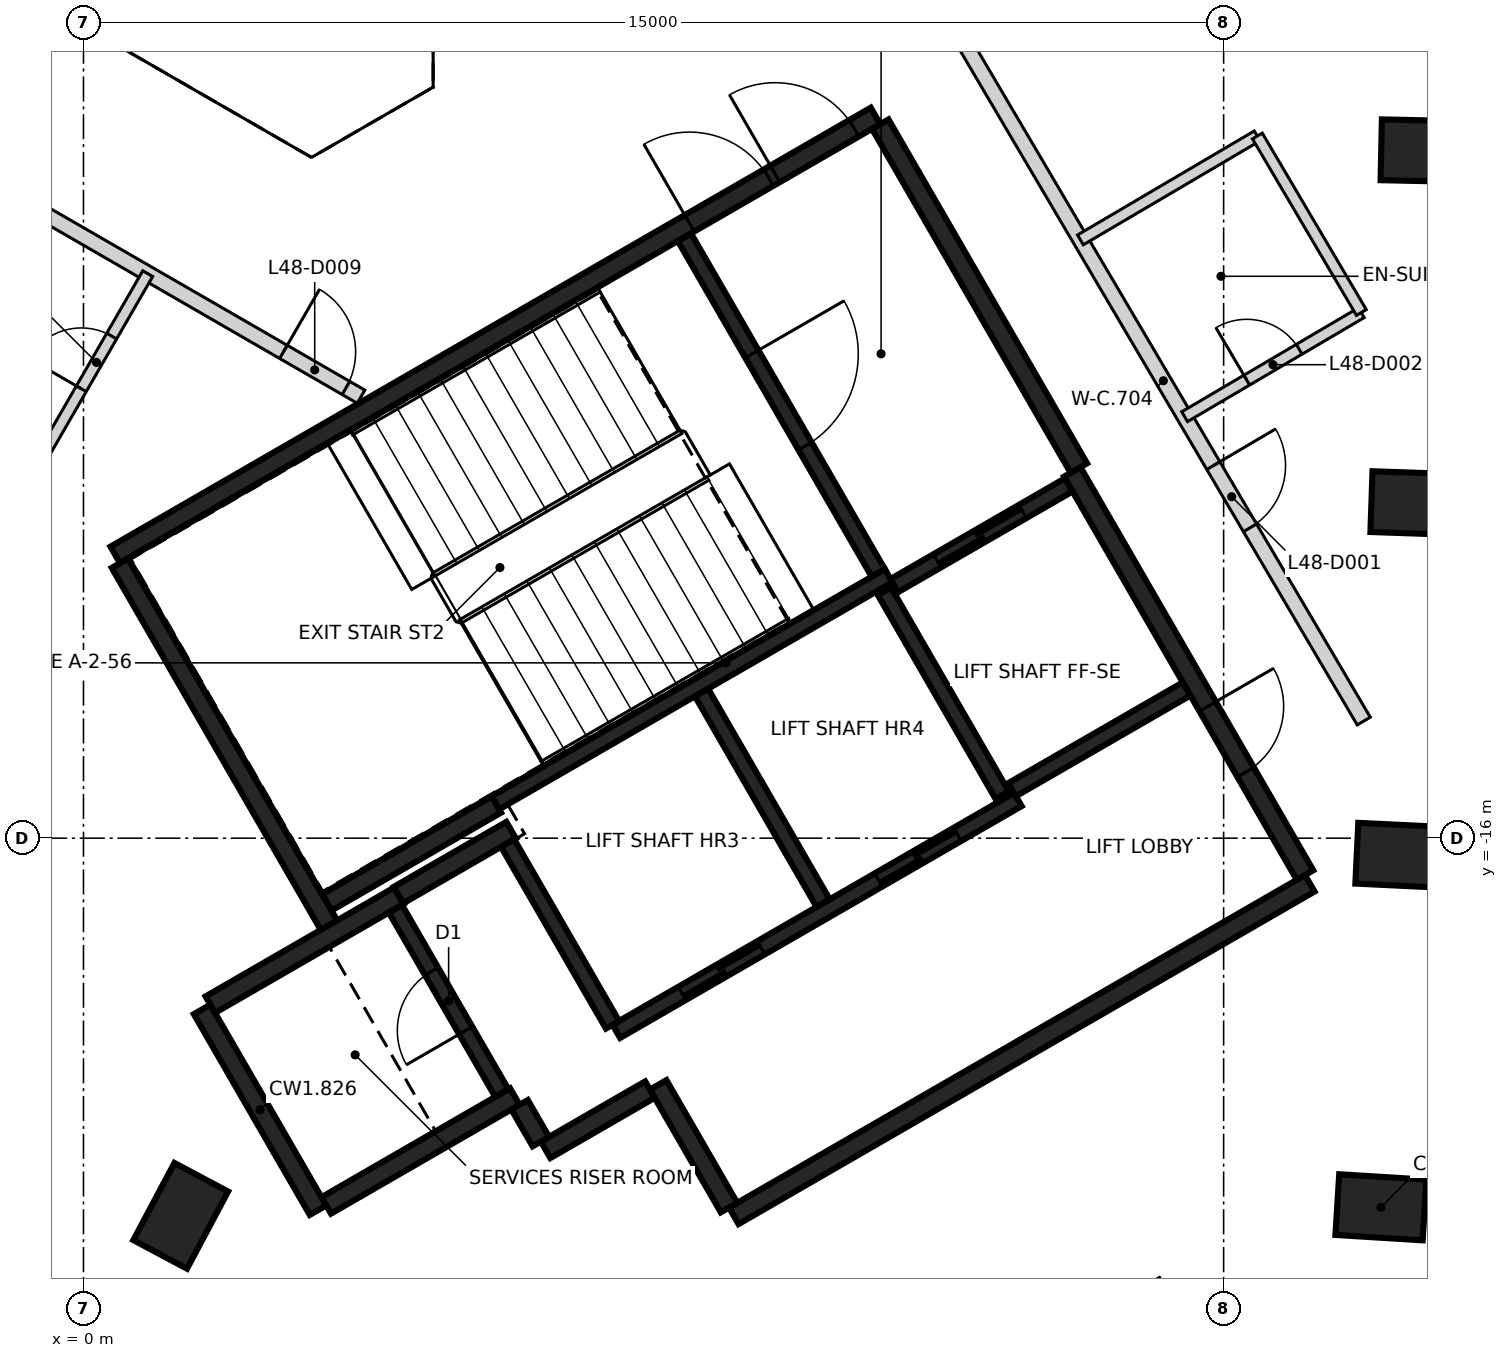
"""IFC4 building model, lengths in metres.
Left out: names, types, materials, properties, quantities, classifications, styles, units other than length and angle.
Written with IfcOpenShell. Run it as: python <this file> out.ifc"""

import sys

from ifc_helpers import new_model, si_unit, direction, frame, frame_2d, origin, origin_2d, place, context, subcontext, project, spatial, rectangle, extrude, element, fill, save


model = new_model("IFC4")
c1 = context("Model", 3, precision=1e-05, world=origin(), true_north=direction((0.0, 1.0)))
c2 = subcontext(c1, "Body", "Model", "MODEL_VIEW")
j1 = project(units=[si_unit("LENGTHUNIT", "METRE"), si_unit("PLANEANGLEUNIT", "RADIAN")], contexts=[c1])
p1 = place(None, origin())
s1 = spatial("IfcSite", under=j1, at=p1, CompositionType="ELEMENT")
p2 = place(p1, origin())
s2 = spatial("IfcBuilding", under=s1, at=p2, CompositionType="ELEMENT")
p3 = place(p2, frame((0.0, 0.0, 193.6)))
s3 = spatial("IfcBuildingStorey", under=s2, at=p3, CompositionType="ELEMENT", Elevation=193.6)
for number, where, z_axis, x_axis in (
    (1, (17.07, -20.856, -0.35), (0.0, 0.0, 1.0), (-0.998, 0.062, 0.0)),
    (2, (17.326, -16.226, -0.35), (0.0, 0.0, 1.0), (-0.999, 0.048, 0.0)),
    (3, (17.519, -11.592, -0.35), (0.0, 0.0, 1.0), (-0.999, 0.034, 0.0)),
    (4, (17.648, -6.956, -0.35), (0.0, 0.0, 1.0), (-1.0, 0.021, 0.0)),
    (5, (1.279, -20.968, -0.35), (0.0, 0.0, 1.0), (0.47, 0.883, 0.0)),
):
    element("IfcColumn", number, at=place(p3, frame(where, z_axis=z_axis, x_axis=x_axis)), inside=s3, PredefinedType="COLUMN", context=c2, shape_type="SweptSolid", body=[
        extrude(rectangle(XDim=1.15, YDim=0.8, at=origin_2d()), origin(), (0.0, 0.0, 1.0), 3.6),
    ])
p4 = place(p3, frame((0.417, -12.273, 0.0), z_axis=(0.0, 0.0, 1.0), x_axis=(0.866021906294, 0.500006057782, 0.0)))
e6 = element("IfcWall", 6, at=p4, inside=s3, PredefinedType="SHEAR", context=c2, shape_type="SweptSolid", body=[
    extrude(rectangle(XDim=11.55, YDim=0.25, at=frame_2d((5.775, 0.0))), origin(), (0.0, 0.0, 1.0), 3.25),
])
p5 = place(p4, frame((10.025, 0.0, 0.0)))
e7 = element("IfcOpeningElement", 7, at=p5, cuts=e6, PredefinedType="OPENING", context=c2, shape_type="SweptSolid", body=[
    extrude(rectangle(XDim=1.2, YDim=2.1, at=frame_2d((0.6, 1.05))), frame((0.0, 0.135, 0.0), z_axis=(0.0, -1.0, 0.0), x_axis=(1.0, 0.0, 0.0)), (0.0, 0.0, 1.0), 0.27),
])
p6 = place(p4, frame((8.725, 0.0, 0.0)))
e8 = element("IfcOpeningElement", 8, at=p6, cuts=e6, PredefinedType="OPENING", context=c2, shape_type="SweptSolid", body=[
    extrude(rectangle(XDim=1.2, YDim=2.1, at=frame_2d((0.6, 1.05))), frame((0.0, 0.135, 0.0), z_axis=(0.0, -1.0, 0.0), x_axis=(1.0, 0.0, 0.0)), (0.0, 0.0, 1.0), 0.27),
])
p7 = place(p3, frame((16.133, -16.594, 0.0), z_axis=(0.0, 0.0, 1.0), x_axis=(-0.866022959057, -0.500004234368, 0.0)))
e9 = element("IfcWall", 9, at=p7, inside=s3, PredefinedType="SHEAR", context=c2, shape_type="SweptSolid", body=[
    extrude(rectangle(XDim=8.75, YDim=0.25, at=frame_2d((4.375, 0.0))), origin(), (0.0, 0.0, 1.0), 3.25),
])
p8 = place(p3, frame((13.008, -11.181, 0.0), z_axis=(0.0, 0.0, 1.0), x_axis=(0.500001955336, -0.866024274868, 0.0)))
e10 = element("IfcWall", 10, at=p8, inside=s3, PredefinedType="SHEAR", context=c2, shape_type="SweptSolid", body=[
    extrude(rectangle(XDim=6.125, YDim=0.25, at=frame_2d((3.062, 0.0))), origin(), (0.0, 0.0, 1.0), 3.25),
])
p9 = place(p8, frame((3.563, 0.0, 0.0)))
e11 = element("IfcOpeningElement", 11, at=p9, cuts=e10, PredefinedType="OPENING", context=c2, shape_type="SweptSolid", body=[
    extrude(rectangle(XDim=1.0, YDim=2.1, at=frame_2d((0.5, 1.05))), frame((0.0, 0.135, 0.0), z_axis=(0.0, -1.0, 0.0), x_axis=(1.0, 0.0, 0.0)), (0.0, 0.0, 1.0), 0.27),
])
p10 = place(p3, frame((3.235, -17.153, 0.0), z_axis=(0.0, 0.0, 1.0), x_axis=(-0.500008851346, 0.866020293397, 0.0)))
e12 = element("IfcWall", 12, at=p10, inside=s3, PredefinedType="SHEAR", context=c2, shape_type="SweptSolid", body=[
    extrude(rectangle(XDim=5.51, YDim=0.25, at=frame_2d((2.755, 0.0))), origin(), (0.0, 0.0, 1.0), 3.25),
])
p11 = place(p3, frame((10.483, -6.606, 0.0), z_axis=(0.0, 0.0, 1.0), x_axis=(0.49999885962, -0.866026062182, 0.0)))
e13 = element("IfcWall", 13, at=p11, inside=s3, PredefinedType="SHEAR", context=c2, shape_type="SweptSolid", body=[
    extrude(rectangle(XDim=5.225, YDim=0.25, at=frame_2d((2.612, 0.0))), origin(), (0.0, 0.0, 1.0), 3.25),
])
p12 = place(p3, frame((3.085, -20.894, 0.0), z_axis=(0.0, 0.0, 1.0), x_axis=(-0.499978833458, 0.866037623948, 0.0)))
e14 = element("IfcWall", 14, at=p12, inside=s3, PredefinedType="SHEAR", context=c2, shape_type="SweptSolid", body=[
    extrude(rectangle(XDim=3.05, YDim=0.25, at=frame_2d((1.525, 0.0))), origin(), (0.0, 0.0, 1.0), 3.25),
])
p13 = place(p3, frame((1.669, -18.19, 0.0), z_axis=(0.0, 0.0, 1.0), x_axis=(0.866042235819, 0.499970844928, 0.0)))
e15 = element("IfcWall", 15, at=p13, inside=s3, PredefinedType="SHEAR", context=c2, shape_type="SweptSolid", body=[
    extrude(rectangle(XDim=2.865, YDim=0.25, at=frame_2d((1.432, 0.0))), origin(), (0.0, 0.0, 1.0), 3.25),
])
p14 = place(p3, frame((5.675, -19.399, 0.0), z_axis=(0.0, 0.0, 1.0), x_axis=(-0.866026637627, -0.499997862916, 0.0)))
e16 = element("IfcWall", 16, at=p14, inside=s3, PredefinedType="SHEAR", context=c2, shape_type="SweptSolid", body=[
    extrude(rectangle(XDim=2.865, YDim=0.25, at=frame_2d((1.432, 0.0))), origin(), (0.0, 0.0, 1.0), 3.25),
])
p15 = place(p3, frame((5.431, -15.556, 0.0), z_axis=(0.0, 0.0, 1.0), x_axis=(-0.866022940537, -0.500004266446, 0.0)))
e17 = element("IfcWall", 17, at=p15, inside=s3, PredefinedType="SHEAR", context=c2, shape_type="SweptSolid", body=[
    extrude(rectangle(XDim=2.575, YDim=0.25, at=frame_2d((1.287, 0.0))), origin(), (0.0, 0.0, 1.0), 3.25),
])
p16 = place(p3, frame((8.493, -20.86, 0.0), z_axis=(0.0, 0.0, 1.0), x_axis=(-0.500039802285, 0.866002422705, 0.0)))
e18 = element("IfcWall", 18, at=p16, inside=s3, PredefinedType="SHEAR", context=c2, shape_type="SweptSolid", body=[
    extrude(rectangle(XDim=1.865, YDim=0.25, at=frame_2d((0.932, 0.0))), origin(), (0.0, 0.0, 1.0), 3.25),
])
p17 = place(p3, frame((4.145, -16.749, 0.0), z_axis=(0.0, 0.0, 1.0), x_axis=(0.866038183914, 0.499977863513, 0.0)))
e19 = element("IfcWall", 19, at=p17, inside=s3, PredefinedType="SHEAR", context=c2, shape_type="SweptSolid", body=[
    extrude(rectangle(XDim=1.71, YDim=0.25, at=frame_2d((0.855, 0.0))), origin(), (0.0, 0.0, 1.0), 3.25),
])
p18 = place(p3, frame((7.452, -19.308, 0.0), z_axis=(0.0, 0.0, 1.0), x_axis=(-0.866044474677, -0.49996696679, 0.0)))
e20 = element("IfcWall", 20, at=p18, inside=s3, PredefinedType="SHEAR", context=c2, shape_type="SweptSolid", body=[
    extrude(rectangle(XDim=1.584, YDim=0.25, at=frame_2d((0.792, 0.0))), origin(), (0.0, 0.0, 1.0), 3.25),
])
p19 = place(p3, frame((6.017, -19.992, 0.0), z_axis=(0.0, 0.0, 1.0), x_axis=(-0.500364886717, 0.865814633822, 0.0)))
e21 = element("IfcWall", 21, at=p19, inside=s3, PredefinedType="SHEAR", context=c2, shape_type="SweptSolid", body=[
    extrude(rectangle(XDim=0.559, YDim=0.25, at=frame_2d((0.28, 0.0))), origin(), (0.0, 0.0, 1.0), 3.25),
])
p20 = place(p3, frame((5.419, -15.534, 0.0), z_axis=(0.0, 0.0, 1.0), x_axis=(0.866029065029, 0.499993658486, 0.0)))
e22 = element("IfcWall", 22, at=p20, inside=s3, PredefinedType="SHEAR", context=c2, shape_type="SweptSolid", body=[
    extrude(rectangle(XDim=5.974, YDim=0.2, at=frame_2d((2.987, 0.0))), origin(), (0.0, 0.0, 1.0), 3.25),
])
p21 = place(p3, frame((7.01, -18.542, 0.0), z_axis=(0.0, 0.0, 1.0), x_axis=(0.866030299012, 0.499991521122, 0.0)))
e23 = element("IfcWall", 23, at=p21, inside=s3, PredefinedType="SHEAR", context=c2, shape_type="SweptSolid", body=[
    extrude(rectangle(XDim=6.1, YDim=0.2, at=frame_2d((3.05, 0.0))), origin(), (0.0, 0.0, 1.0), 3.25),
])
p22 = place(p21, frame((1.0, 0.0, 0.0)))
e24 = element("IfcOpeningElement", 24, at=p22, cuts=e23, PredefinedType="OPENING", context=c2, shape_type="SweptSolid", body=[
    extrude(rectangle(XDim=1.2, YDim=2.1, at=frame_2d((0.6, 1.05))), frame((0.0, 0.11, 0.0), z_axis=(0.0, -1.0, 0.0), x_axis=(1.0, 0.0, 0.0)), (0.0, 0.0, 1.0), 0.22),
])
p23 = place(p21, frame((3.982, 0.0, 0.0)))
e25 = element("IfcOpeningElement", 25, at=p23, cuts=e23, PredefinedType="OPENING", context=c2, shape_type="SweptSolid", body=[
    extrude(rectangle(XDim=1.2, YDim=2.1, at=frame_2d((0.6, 1.05))), frame((0.0, 0.11, 0.0), z_axis=(0.0, -1.0, 0.0), x_axis=(1.0, 0.0, 0.0)), (0.0, 0.0, 1.0), 0.22),
])
p24 = place(p3, frame((7.906, -8.094, 0.0), z_axis=(0.0, 0.0, 1.0), x_axis=(0.500027839223, -0.866009330205, 0.0)))
e26 = element("IfcWall", 26, at=p24, inside=s3, PredefinedType="SHEAR", context=c2, shape_type="SweptSolid", body=[
    extrude(rectangle(XDim=5.098, YDim=0.2, at=frame_2d((2.549, 0.0))), origin(), (0.0, 0.0, 1.0), 3.25),
])
p25 = place(p24, frame((1.774, 0.0, 0.0)))
e27 = element("IfcOpeningElement", 27, at=p25, cuts=e26, PredefinedType="OPENING", context=c2, shape_type="SweptSolid", body=[
    extrude(rectangle(XDim=1.4, YDim=2.1, at=frame_2d((0.7, 1.05))), frame((0.0, 0.11, 0.0), z_axis=(0.0, -1.0, 0.0), x_axis=(1.0, 0.0, 0.0)), (0.0, 0.0, 1.0), 0.22),
])
p26 = place(p3, frame((8.132, -14.084, 0.0), z_axis=(0.0, 0.0, 1.0), x_axis=(0.499997778408, -0.866026686418, 0.0)))
e28 = element("IfcWall", 28, at=p26, inside=s3, PredefinedType="SHEAR", context=c2, shape_type="SweptSolid", body=[
    extrude(rectangle(XDim=3.198, YDim=0.2, at=frame_2d((1.599, 0.0))), origin(), (0.0, 0.0, 1.0), 3.25),
])
p27 = place(p3, frame((5.503, -19.352, 0.0), z_axis=(0.0, 0.0, 1.0), x_axis=(-0.499986818241, 0.866033014143, 0.0)))
e29 = element("IfcWall", 29, at=p27, inside=s3, PredefinedType="SHEAR", context=c2, shape_type="SweptSolid", body=[
    extrude(rectangle(XDim=2.798, YDim=0.2, at=frame_2d((1.399, 0.0))), origin(), (0.0, 0.0, 1.0), 3.25),
])
p28 = place(p27, frame((0.949, 0.0, 0.0)))
e30 = element("IfcOpeningElement", 30, at=p28, cuts=e29, PredefinedType="OPENING", context=c2, shape_type="SweptSolid", body=[
    extrude(rectangle(XDim=0.9, YDim=2.1, at=frame_2d((0.45, 1.05))), frame((0.0, 0.11, 0.0), z_axis=(0.0, -1.0, 0.0), x_axis=(1.0, 0.0, 0.0)), (0.0, 0.0, 1.0), 0.22),
])
p29 = place(p3, frame((6.96, -18.455, 0.0), z_axis=(0.0, 0.0, 1.0), x_axis=(-0.499926705758, 0.866067716099, 0.0)))
e31 = element("IfcWall", 31, at=p29, inside=s3, PredefinedType="SHEAR", context=c2, shape_type="SweptSolid", body=[
    extrude(rectangle(XDim=2.759, YDim=0.2, at=frame_2d((1.38, 0.0))), origin(), (0.0, 0.0, 1.0), 3.25),
])
p30 = place(p3, frame((12.088, -15.437, 0.0), z_axis=(0.0, 0.0, 1.0), x_axis=(-0.500026960575, 0.86600983753, 0.0)))
e32 = element("IfcWall", 32, at=p30, inside=s3, PredefinedType="SHEAR", context=c2, shape_type="SweptSolid", body=[
    extrude(rectangle(XDim=3.1, YDim=0.2, at=frame_2d((1.55, 0.0))), origin(), (0.0, 0.0, 1.0), 3.25),
])
p31 = place(p3, frame((10.666, -12.678, 0.0), z_axis=(0.0, 0.0, 1.0), x_axis=(0.866018407898, 0.500012117035, 0.0)))
e33 = element("IfcWall", 33, at=p31, inside=s3, PredefinedType="SHEAR", context=c2, shape_type="SweptSolid", body=[
    extrude(rectangle(XDim=2.651, YDim=0.2, at=frame_2d((1.325, 0.0))), origin(), (0.0, 0.0, 1.0), 3.25),
])
p32 = place(p31, frame((0.652, 0.0, 0.0)))
e34 = element("IfcOpeningElement", 34, at=p32, cuts=e33, PredefinedType="OPENING", context=c2, shape_type="SweptSolid", body=[
    extrude(rectangle(XDim=1.3, YDim=2.1, at=frame_2d((0.65, 1.05))), frame((0.0, 0.11, 0.0), z_axis=(0.0, -1.0, 0.0), x_axis=(1.0, 0.0, 0.0)), (0.0, 0.0, 1.0), 0.22),
])
p33 = place(p3, frame((14.512, -14.037, 0.0), z_axis=(0.0, 0.0, 1.0), x_axis=(-0.866018407898, -0.500012117035, 0.0)))
e35 = element("IfcWall", 35, at=p33, inside=s3, PredefinedType="SHEAR", context=c2, shape_type="SweptSolid", body=[
    extrude(rectangle(XDim=2.651, YDim=0.2, at=frame_2d((1.325, 0.0))), origin(), (0.0, 0.0, 1.0), 3.25),
])
p34 = place(p3, frame((-7.589, -3.702, 0.0), z_axis=(0.0, 0.0, 1.0), x_axis=(0.86602490244, -0.500000868353, 0.0)))
e36 = element("IfcWall", 36, at=p34, inside=s3, PredefinedType="PARTITIONING", context=c2, shape_type="SweptSolid", body=[
    extrude(rectangle(XDim=12.98, YDim=0.2, at=frame_2d((6.49, 0.0))), origin(), (0.0, 0.0, 1.0), 3.25),
])
p35 = place(p34, frame((11.8, 0.0, 0.0)))
e37 = element("IfcOpeningElement", 37, at=p35, cuts=e36, PredefinedType="OPENING", context=c2, shape_type="SweptSolid", body=[
    extrude(rectangle(XDim=0.95, YDim=2.1, at=frame_2d((0.475, 1.05))), frame((0.0, 0.11, 0.0), z_axis=(0.0, -1.0, 0.0), x_axis=(1.0, 0.0, 0.0)), (0.0, 0.0, 1.0), 0.22),
])
p36 = place(p3, frame((11.571, -5.505, 0.0), z_axis=(0.0, 0.0, 1.0), x_axis=(0.507402039651, -0.861709446483, 0.0)))
e38 = element("IfcWall", 38, at=p36, inside=s3, PredefinedType="PARTITIONING", context=c2, shape_type="SweptSolid", body=[
    extrude(rectangle(XDim=10.391, YDim=0.2, at=frame_2d((5.196, 0.0))), origin(), (0.0, 0.0, 1.0), 3.25),
])
p37 = place(p36, frame((6.491, 0.0, 0.0)))
e39 = element("IfcOpeningElement", 39, at=p37, cuts=e38, PredefinedType="OPENING", context=c2, shape_type="SweptSolid", body=[
    extrude(rectangle(XDim=0.95, YDim=2.1, at=frame_2d((0.475, 1.05))), frame((0.0, 0.11, 0.0), z_axis=(0.0, -1.0, 0.0), x_axis=(1.0, 0.0, 0.0)), (0.0, 0.0, 1.0), 0.22),
])
p38 = place(p3, frame((-0.502, -10.908, 0.0), z_axis=(0.0, 0.0, 1.0), x_axis=(0.499675408556, 0.866212725654, 0.0)))
e40 = element("IfcWall", 40, at=p38, inside=s3, PredefinedType="PARTITIONING", context=c2, shape_type="SweptSolid", body=[
    extrude(rectangle(XDim=2.696, YDim=0.15, at=frame_2d((1.348, 0.0))), origin(), (0.0, 0.0, 1.0), 3.25),
])
p39 = place(p38, frame((0.948, 0.0, 0.0)))
e41 = element("IfcOpeningElement", 41, at=p39, cuts=e40, PredefinedType="OPENING", context=c2, shape_type="SweptSolid", body=[
    extrude(rectangle(XDim=0.8, YDim=2.1, at=frame_2d((0.4, 1.05))), frame((0.0, 0.085, 0.0), z_axis=(0.0, -1.0, 0.0), x_axis=(1.0, 0.0, 0.0)), (0.0, 0.0, 1.0), 0.17),
])
p40 = place(p3, frame((13.116, -8.129, 0.0), z_axis=(0.0, 0.0, 1.0), x_axis=(0.861885352062, 0.507103184669, 0.0)))
e42 = element("IfcWall", 42, at=p40, inside=s3, PredefinedType="PARTITIONING", context=c2, shape_type="SweptSolid", body=[
    extrude(rectangle(XDim=2.698, YDim=0.15, at=frame_2d((1.349, 0.0))), origin(), (0.0, 0.0, 1.0), 3.25),
])
p41 = place(p3, frame((14.487, -10.455, 0.0), z_axis=(0.0, 0.0, 1.0), x_axis=(0.861752634979, 0.507328686461, 0.0)))
e43 = element("IfcWall", 43, at=p41, inside=s3, PredefinedType="PARTITIONING", context=c2, shape_type="SweptSolid", body=[
    extrude(rectangle(XDim=2.697, YDim=0.15, at=frame_2d((1.348, 0.0))), origin(), (0.0, 0.0, 1.0), 3.25),
])
p42 = place(p41, frame((0.948, 0.0, 0.0)))
e44 = element("IfcOpeningElement", 44, at=p42, cuts=e43, PredefinedType="OPENING", context=c2, shape_type="SweptSolid", body=[
    extrude(rectangle(XDim=0.8, YDim=2.1, at=frame_2d((0.4, 1.05))), frame((0.0, 0.085, 0.0), z_axis=(0.0, -1.0, 0.0), x_axis=(1.0, 0.0, 0.0)), (0.0, 0.0, 1.0), 0.17),
])
p43 = place(p3, frame((15.444, -6.762, 0.0), z_axis=(0.0, 0.0, 1.0), x_axis=(0.507578234334, -0.861605673165, 0.0)))
e45 = element("IfcWall", 45, at=p43, inside=s3, PredefinedType="PARTITIONING", context=c2, shape_type="SweptSolid", body=[
    extrude(rectangle(XDim=2.695, YDim=0.15, at=frame_2d((1.348, 0.0))), origin(), (0.0, 0.0, 1.0), 3.25),
])
p44 = place(p32, origin())
e46 = element("IfcDoor", 46, at=p44, inside=s3, OperationType="SLIDING_TO_RIGHT", PredefinedType="DOOR", context=c2, shape_type="SweptSolid", body=[
    extrude(rectangle(XDim=1.3, YDim=2.1, at=frame_2d((0.65, 1.05))), frame((0.0, 0.025, 0.0), z_axis=(0.0, -1.0, 0.0), x_axis=(1.0, 0.0, 0.0)), (0.0, 0.0, 1.0), 0.05),
])
fill(e34, e46)
p45 = place(p22, origin())
e47 = element("IfcDoor", 47, at=p45, inside=s3, OperationType="DOUBLE_DOOR_SLIDING", PredefinedType="DOOR", context=c2, shape_type="SweptSolid", body=[
    extrude(rectangle(XDim=1.2, YDim=2.1, at=frame_2d((0.6, 1.05))), frame((0.0, 0.025, 0.0), z_axis=(0.0, -1.0, 0.0), x_axis=(1.0, 0.0, 0.0)), (0.0, 0.0, 1.0), 0.05),
])
fill(e24, e47)
p46 = place(p23, origin())
e48 = element("IfcDoor", 48, at=p46, inside=s3, OperationType="DOUBLE_DOOR_SLIDING", PredefinedType="DOOR", context=c2, shape_type="SweptSolid", body=[
    extrude(rectangle(XDim=1.2, YDim=2.1, at=frame_2d((0.6, 1.05))), frame((0.0, 0.025, 0.0), z_axis=(0.0, -1.0, 0.0), x_axis=(1.0, 0.0, 0.0)), (0.0, 0.0, 1.0), 0.05),
])
fill(e25, e48)
p47 = place(p9, origin())
e49 = element("IfcDoor", 49, at=p47, inside=s3, OperationType="SINGLE_SWING_LEFT", PredefinedType="DOOR", context=c2, shape_type="SweptSolid", body=[
    extrude(rectangle(XDim=1.0, YDim=2.1, at=frame_2d((0.5, 1.05))), frame((0.0, 0.025, 0.0), z_axis=(0.0, -1.0, 0.0), x_axis=(1.0, 0.0, 0.0)), (0.0, 0.0, 1.0), 0.05),
])
fill(e11, e49)
p48 = place(p5, origin())
e50 = element("IfcDoor", 50, at=p48, inside=s3, OperationType="SINGLE_SWING_LEFT", PredefinedType="DOOR", context=c2, shape_type="SweptSolid", body=[
    extrude(rectangle(XDim=1.2, YDim=2.1, at=frame_2d((0.6, 1.05))), frame((0.0, 0.025, 0.0), z_axis=(0.0, -1.0, 0.0), x_axis=(1.0, 0.0, 0.0)), (0.0, 0.0, 1.0), 0.05),
])
fill(e7, e50)
p49 = place(p6, origin())
e51 = element("IfcDoor", 51, at=p49, inside=s3, OperationType="SINGLE_SWING_RIGHT", PredefinedType="DOOR", context=c2, shape_type="SweptSolid", body=[
    extrude(rectangle(XDim=1.2, YDim=2.1, at=frame_2d((0.6, 1.05))), frame((0.0, 0.025, 0.0), z_axis=(0.0, -1.0, 0.0), x_axis=(1.0, 0.0, 0.0)), (0.0, 0.0, 1.0), 0.05),
])
fill(e8, e51)
p50 = place(p25, origin())
e52 = element("IfcDoor", 52, at=p50, inside=s3, OperationType="SINGLE_SWING_RIGHT", PredefinedType="DOOR", context=c2, shape_type="SweptSolid", body=[
    extrude(rectangle(XDim=1.4, YDim=2.1, at=frame_2d((0.7, 1.05))), frame((0.0, 0.025, 0.0), z_axis=(0.0, -1.0, 0.0), x_axis=(1.0, 0.0, 0.0)), (0.0, 0.0, 1.0), 0.05),
])
fill(e27, e52)
p51 = place(p28, origin())
e53 = element("IfcDoor", 53, at=p51, inside=s3, OperationType="SINGLE_SWING_LEFT", PredefinedType="DOOR", context=c2, shape_type="SweptSolid", body=[
    extrude(rectangle(XDim=0.9, YDim=2.1, at=frame_2d((0.45, 1.05))), frame((0.0, 0.025, 0.0), z_axis=(0.0, -1.0, 0.0), x_axis=(1.0, 0.0, 0.0)), (0.0, 0.0, 1.0), 0.05),
])
fill(e30, e53)
p52 = place(p37, origin())
e54 = element("IfcDoor", 54, at=p52, inside=s3, OperationType="SINGLE_SWING_LEFT", PredefinedType="DOOR", context=c2, shape_type="SweptSolid", body=[
    extrude(rectangle(XDim=0.95, YDim=2.1, at=frame_2d((0.475, 1.05))), frame((0.0, 0.025, 0.0), z_axis=(0.0, -1.0, 0.0), x_axis=(1.0, 0.0, 0.0)), (0.0, 0.0, 1.0), 0.05),
])
fill(e39, e54)
p53 = place(p42, frame((0.8, 0.0, 0.0), z_axis=(0.0, 0.0, 1.0), x_axis=(-1.0, 0.0, 0.0)))
e55 = element("IfcDoor", 55, at=p53, inside=s3, OperationType="SINGLE_SWING_LEFT", PredefinedType="DOOR", context=c2, shape_type="SweptSolid", body=[
    extrude(rectangle(XDim=0.8, YDim=2.1, at=frame_2d((0.4, 1.05))), frame((0.0, 0.025, 0.0), z_axis=(0.0, -1.0, 0.0), x_axis=(1.0, 0.0, 0.0)), (0.0, 0.0, 1.0), 0.05),
])
fill(e44, e55)
p54 = place(p35, frame((0.95, 0.0, 0.0), z_axis=(0.0, 0.0, 1.0), x_axis=(-1.0, 0.0, 0.0)))
e56 = element("IfcDoor", 56, at=p54, inside=s3, OperationType="SINGLE_SWING_LEFT", PredefinedType="DOOR", context=c2, shape_type="SweptSolid", body=[
    extrude(rectangle(XDim=0.95, YDim=2.1, at=frame_2d((0.475, 1.05))), frame((0.0, 0.025, 0.0), z_axis=(0.0, -1.0, 0.0), x_axis=(1.0, 0.0, 0.0)), (0.0, 0.0, 1.0), 0.05),
])
fill(e37, e56)
p55 = place(p39, frame((0.8, 0.0, 0.0), z_axis=(0.0, 0.0, 1.0), x_axis=(-1.0, 0.0, 0.0)))
e57 = element("IfcDoor", 57, at=p55, inside=s3, OperationType="SINGLE_SWING_LEFT", PredefinedType="DOOR", context=c2, shape_type="SweptSolid", body=[
    extrude(rectangle(XDim=0.8, YDim=2.1, at=frame_2d((0.4, 1.05))), frame((0.0, 0.025, 0.0), z_axis=(0.0, -1.0, 0.0), x_axis=(1.0, 0.0, 0.0)), (0.0, 0.0, 1.0), 0.05),
])
fill(e41, e57)
save(model, sys.argv[1])
